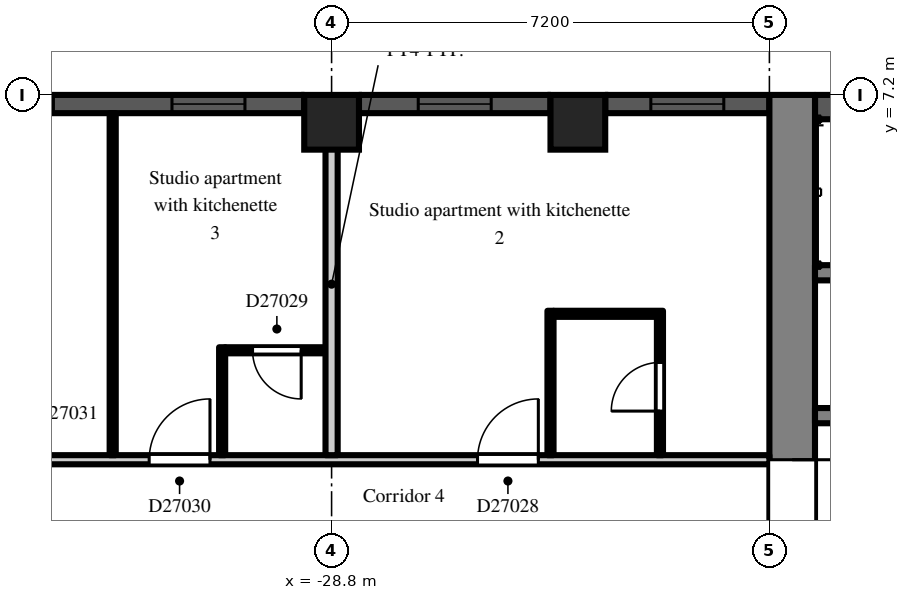
"""IFC4 building model, lengths in metres.
Left out: names, types, materials, properties, quantities, classifications, styles, units other than length and angle.
Written with IfcOpenShell. Run it as: python <this file> out.ifc"""

import sys

from ifc_helpers import new_model, si_unit, direction, frame, frame_2d, origin, origin_2d, place, context, subcontext, project, spatial, rectangle, extrude, element, fill, save


model = new_model("IFC4")
c1 = context("Model", 3, precision=1e-05, world=origin(), true_north=direction((0.0, 1.0)))
c2 = subcontext(c1, "Body", "Model", "MODEL_VIEW")
j1 = project(units=[si_unit("LENGTHUNIT", "METRE"), si_unit("PLANEANGLEUNIT", "RADIAN")], contexts=[c1])
p1 = place(None, origin())
s1 = spatial("IfcSite", under=j1, at=p1, CompositionType="ELEMENT")
p2 = place(p1, origin())
s2 = spatial("IfcBuilding", under=s1, at=p2, CompositionType="ELEMENT")
p3 = place(p2, frame((0.0, 0.0, 191.7)))
s3 = spatial("IfcBuildingStorey", under=s2, at=p3, CompositionType="ELEMENT", Elevation=191.7)
for number, where, z_axis, x_axis in (
    (1, (-28.8, 6.75, 0.0), (0.0, 0.0, 1.0), (1.0, 0.0, 0.0)),
    (2, (-24.75, 6.75, 0.0), (0.0, 0.0, 1.0), (1.0, 0.0, 0.0)),
):
    element("IfcColumn", number, at=place(p3, frame(where, z_axis=z_axis, x_axis=x_axis)), inside=s3, PredefinedType="COLUMN", context=c2, shape_type="SweptSolid", body=[
        extrude(rectangle(XDim=0.9, YDim=0.9, at=origin_2d()), origin(), (0.0, 0.0, 1.0), 3.0),
    ])
p4 = place(p3, frame((-21.6, 7.05, 0.0), z_axis=(0.0, 0.0, 1.0), x_axis=(-1.0, 0.0, 0.0)))
e3 = element("IfcWall", 3, at=p4, inside=s3, PredefinedType="SOLIDWALL", context=c2, shape_type="SweptSolid", body=[
    extrude(rectangle(XDim=2.7, YDim=0.3, at=frame_2d((1.35, 0.0))), origin(), (0.0, 0.0, 1.0), 2.3),
])
p5 = place(p4, frame((0.75, 0.0, 0.2)))
e4 = element("IfcOpeningElement", 4, at=p5, cuts=e3, PredefinedType="OPENING", context=c2, shape_type="SweptSolid", body=[
    extrude(rectangle(XDim=1.2, YDim=1.85, at=frame_2d((0.6, 0.925))), frame((0.0, 0.16, 0.0), z_axis=(0.0, -1.0, 0.0), x_axis=(1.0, 0.0, 0.0)), (0.0, 0.0, 1.0), 0.32),
])
p6 = place(p3, frame((-25.2, 7.05, 0.0), z_axis=(0.0, 0.0, 1.0), x_axis=(-1.0, 0.0, 0.0)))
e5 = element("IfcWall", 5, at=p6, inside=s3, PredefinedType="SOLIDWALL", context=c2, shape_type="SweptSolid", body=[
    extrude(rectangle(XDim=3.15, YDim=0.3, at=frame_2d((1.575, 0.0))), origin(), (0.0, 0.0, 1.0), 2.3),
])
p7 = place(p6, frame((0.975, 0.0, 0.2)))
e6 = element("IfcOpeningElement", 6, at=p7, cuts=e5, PredefinedType="OPENING", context=c2, shape_type="SweptSolid", body=[
    extrude(rectangle(XDim=1.2, YDim=1.85, at=frame_2d((0.6, 0.925))), frame((0.0, 0.16, 0.0), z_axis=(0.0, -1.0, 0.0), x_axis=(1.0, 0.0, 0.0)), (0.0, 0.0, 1.0), 0.32),
])
p8 = place(p3, frame((-29.25, 7.05, 0.0), z_axis=(0.0, 0.0, 1.0), x_axis=(-1.0, 0.0, 0.0)))
e7 = element("IfcWall", 7, at=p8, inside=s3, PredefinedType="SOLIDWALL", context=c2, shape_type="SweptSolid", body=[
    extrude(rectangle(XDim=6.3, YDim=0.3, at=frame_2d((3.15, 0.0))), origin(), (0.0, 0.0, 1.0), 2.3),
])
p9 = place(p8, frame((0.975, 0.0, 0.2)))
e8 = element("IfcOpeningElement", 8, at=p9, cuts=e7, PredefinedType="OPENING", context=c2, shape_type="SweptSolid", body=[
    extrude(rectangle(XDim=1.2, YDim=1.85, at=frame_2d((0.6, 0.925))), frame((0.0, 0.16, 0.0), z_axis=(0.0, -1.0, 0.0), x_axis=(1.0, 0.0, 0.0)), (0.0, 0.0, 1.0), 0.32),
])
p10 = place(p8, frame((4.125, 0.0, 0.2)))
e9 = element("IfcOpeningElement", 9, at=p10, cuts=e7, PredefinedType="OPENING", context=c2, shape_type="SweptSolid", body=[
    extrude(rectangle(XDim=1.2, YDim=1.85, at=frame_2d((0.6, 0.925))), frame((0.0, 0.16, 0.0), z_axis=(0.0, -1.0, 0.0), x_axis=(1.0, 0.0, 0.0)), (0.0, 0.0, 1.0), 0.32),
])
p11 = place(p3, frame((-21.225, -7.2, 0.0), z_axis=(0.0, 0.0, 1.0), x_axis=(0.0, 1.0, 0.0)))
e10 = element("IfcWall", 10, at=p11, inside=s3, PredefinedType="SHEAR", context=c2, shape_type="SweptSolid", body=[
    extrude(rectangle(XDim=14.4, YDim=0.75, at=frame_2d((7.2, 0.0))), origin(), (0.0, 0.0, 1.0), 2.55),
])
p12 = place(p11, frame((6.0, 0.0, 0.0)))
e11 = element("IfcOpeningElement", 11, at=p12, cuts=e10, PredefinedType="OPENING", context=c2, shape_type="SweptSolid", body=[
    extrude(rectangle(XDim=2.4, YDim=2.2, at=frame_2d((1.2, 1.1))), frame((0.0, 0.385, 0.0), z_axis=(0.0, -1.0, 0.0), x_axis=(1.0, 0.0, 0.0)), (0.0, 0.0, 1.0), 0.77),
])
p13 = place(p3, frame((-7.9, 7.0, 0.0), z_axis=(0.0, 0.0, 1.0), x_axis=(-1.0, 0.0, 0.0)))
e12 = element("IfcWall", 12, at=p13, inside=s3, PredefinedType="SHEAR", context=c2, shape_type="SweptSolid", body=[
    extrude(rectangle(XDim=12.95, YDim=0.4, at=frame_2d((6.475, 0.0))), origin(), (0.0, 0.0, 1.0), 2.55),
])
p14 = place(p3, frame((-7.9, 1.925, 0.0), z_axis=(0.0, 0.0, 1.0), x_axis=(-1.0, 0.0, 0.0)))
e13 = element("IfcWall", 13, at=p14, inside=s3, PredefinedType="SHEAR", context=c2, shape_type="SweptSolid", body=[
    extrude(rectangle(XDim=12.95, YDim=0.25, at=frame_2d((6.475, 0.0))), origin(), (0.0, 0.0, 1.0), 2.55),
])
p15 = place(p14, frame((4.825, 0.0, 0.0)))
e14 = element("IfcOpeningElement", 14, at=p15, cuts=e13, PredefinedType="OPENING", context=c2, shape_type="SweptSolid", body=[
    extrude(rectangle(XDim=1.1, YDim=2.1, at=frame_2d((0.55, 1.05))), frame((0.0, 0.135, 0.0), z_axis=(0.0, -1.0, 0.0), x_axis=(1.0, 0.0, 0.0)), (0.0, 0.0, 1.0), 0.27),
])
p16 = place(p14, frame((7.025, 0.0, 0.0)))
e15 = element("IfcOpeningElement", 15, at=p16, cuts=e13, PredefinedType="OPENING", context=c2, shape_type="SweptSolid", body=[
    extrude(rectangle(XDim=1.1, YDim=2.1, at=frame_2d((0.55, 1.05))), frame((0.0, 0.135, 0.0), z_axis=(0.0, -1.0, 0.0), x_axis=(1.0, 0.0, 0.0)), (0.0, 0.0, 1.0), 0.27),
])
p17 = place(p14, frame((9.225, 0.0, 0.0)))
e16 = element("IfcOpeningElement", 16, at=p17, cuts=e13, PredefinedType="OPENING", context=c2, shape_type="SweptSolid", body=[
    extrude(rectangle(XDim=1.1, YDim=2.1, at=frame_2d((0.55, 1.05))), frame((0.0, 0.135, 0.0), z_axis=(0.0, -1.0, 0.0), x_axis=(1.0, 0.0, 0.0)), (0.0, 0.0, 1.0), 0.27),
])
p18 = place(p14, frame((0.525, 0.0, 0.0)))
e17 = element("IfcOpeningElement", 17, at=p18, cuts=e13, PredefinedType="OPENING", context=c2, shape_type="SweptSolid", body=[
    extrude(rectangle(XDim=0.9, YDim=2.1, at=frame_2d((0.45, 1.05))), frame((0.0, 0.135, 0.0), z_axis=(0.0, -1.0, 0.0), x_axis=(1.0, 0.0, 0.0)), (0.0, 0.0, 1.0), 0.27),
])
p19 = place(p14, frame((2.625, 0.0, 0.0)))
e18 = element("IfcOpeningElement", 18, at=p19, cuts=e13, PredefinedType="OPENING", context=c2, shape_type="SweptSolid", body=[
    extrude(rectangle(XDim=1.1, YDim=2.1, at=frame_2d((0.55, 1.05))), frame((0.0, 0.135, 0.0), z_axis=(0.0, -1.0, 0.0), x_axis=(1.0, 0.0, 0.0)), (0.0, 0.0, 1.0), 0.27),
])
p20 = place(p14, frame((11.525, 0.0, 0.0)))
e19 = element("IfcOpeningElement", 19, at=p20, cuts=e13, PredefinedType="OPENING", context=c2, shape_type="SweptSolid", body=[
    extrude(rectangle(XDim=0.9, YDim=2.1, at=frame_2d((0.45, 1.05))), frame((0.0, 0.135, 0.0), z_axis=(0.0, -1.0, 0.0), x_axis=(1.0, 0.0, 0.0)), (0.0, 0.0, 1.0), 0.27),
])
p21 = place(p3, frame((-12.3, 4.275, 0.0), z_axis=(0.0, 0.0, 1.0), x_axis=(-1.0, 0.0, 0.0)))
e20 = element("IfcWall", 20, at=p21, inside=s3, PredefinedType="SHEAR", context=c2, shape_type="SweptSolid", body=[
    extrude(rectangle(XDim=8.55, YDim=0.25, at=frame_2d((4.275, 0.0))), origin(), (0.0, 0.0, 1.0), 2.55),
])
p22 = place(p3, frame((-36.5, 1.2, 0.0), z_axis=(0.0, 0.0, 1.0), x_axis=(1.0, 0.0, 0.0)))
e21 = element("IfcWall", 21, at=p22, inside=s3, PredefinedType="PARTITIONING", context=c2, shape_type="SweptSolid", body=[
    extrude(rectangle(XDim=14.9, YDim=0.15, at=frame_2d((7.45, 0.0))), origin(), (0.0, 0.0, 1.0), 2.55),
])
p23 = place(p22, frame((10.1, 0.0, 0.0)))
e22 = element("IfcOpeningElement", 22, at=p23, cuts=e21, PredefinedType="OPENING", context=c2, shape_type="SweptSolid", body=[
    extrude(rectangle(XDim=1.0, YDim=2.1, at=frame_2d((0.5, 1.05))), frame((0.0, 0.085, 0.0), z_axis=(0.0, -1.0, 0.0), x_axis=(1.0, 0.0, 0.0)), (0.0, 0.0, 1.0), 0.17),
])
p24 = place(p22, frame((4.7, 0.0, 0.0)))
e23 = element("IfcOpeningElement", 23, at=p24, cuts=e21, PredefinedType="OPENING", context=c2, shape_type="SweptSolid", body=[
    extrude(rectangle(XDim=1.0, YDim=2.1, at=frame_2d((0.5, 1.05))), frame((0.0, 0.085, 0.0), z_axis=(0.0, -1.0, 0.0), x_axis=(1.0, 0.0, 0.0)), (0.0, 0.0, 1.0), 0.17),
])
p25 = place(p22, frame((1.15, 0.0, 0.0)))
e24 = element("IfcOpeningElement", 24, at=p25, cuts=e21, PredefinedType="OPENING", context=c2, shape_type="SweptSolid", body=[
    extrude(rectangle(XDim=1.8, YDim=2.1, at=frame_2d((0.9, 1.05))), frame((0.0, 0.085, 0.0), z_axis=(0.0, -1.0, 0.0), x_axis=(1.0, 0.0, 0.0)), (0.0, 0.0, 1.0), 0.17),
])
p26 = place(p3, frame((-32.4, 1.275, 0.0), z_axis=(0.0, 0.0, 1.0), x_axis=(0.0, 1.0, 0.0)))
e25 = element("IfcWall", 25, at=p26, inside=s3, PredefinedType="PARTITIONING", context=c2, shape_type="SweptSolid", body=[
    extrude(rectangle(XDim=5.625, YDim=0.1, at=frame_2d((2.812, 0.0))), origin(), (0.0, 0.0, 1.0), 2.55),
])
p27 = place(p3, frame((-30.6, 1.275, 0.0), z_axis=(0.0, 0.0, 1.0), x_axis=(0.0, 1.0, 0.0)))
e26 = element("IfcWall", 26, at=p27, inside=s3, PredefinedType="PARTITIONING", context=c2, shape_type="SweptSolid", body=[
    extrude(rectangle(XDim=1.775, YDim=0.1, at=frame_2d((0.888, 0.0))), origin(), (0.0, 0.0, 1.0), 2.55),
])
p28 = place(p3, frame((-30.55, 3.0, 0.0), z_axis=(0.0, 0.0, 1.0), x_axis=(1.0, 0.0, 0.0)))
e27 = element("IfcWall", 27, at=p28, inside=s3, PredefinedType="PARTITIONING", context=c2, shape_type="SweptSolid", body=[
    extrude(rectangle(XDim=1.65, YDim=0.1, at=frame_2d((0.825, 0.0))), origin(), (0.0, 0.0, 1.0), 2.55),
])
p29 = place(p28, frame((0.45, 0.0, 0.0)))
e28 = element("IfcOpeningElement", 28, at=p29, cuts=e27, PredefinedType="OPENING", context=c2, shape_type="SweptSolid", body=[
    extrude(rectangle(XDim=0.8, YDim=2.1, at=frame_2d((0.4, 1.05))), frame((0.0, 0.06, 0.0), z_axis=(0.0, -1.0, 0.0), x_axis=(1.0, 0.0, 0.0)), (0.0, 0.0, 1.0), 0.12),
])
p30 = place(p3, frame((-28.8, 1.275, 0.0), z_axis=(0.0, 0.0, 1.0), x_axis=(0.0, 1.0, 0.0)))
e29 = element("IfcWall", 29, at=p30, inside=s3, PredefinedType="PARTITIONING", context=c2, shape_type="SweptSolid", body=[
    extrude(rectangle(XDim=5.625, YDim=0.2, at=frame_2d((2.812, 0.0))), origin(), (0.0, 0.0, 1.0), 2.55),
])
p31 = place(p3, frame((-25.2, 1.275, 0.0), z_axis=(0.0, 0.0, 1.0), x_axis=(0.0, 1.0, 0.0)))
e30 = element("IfcWall", 30, at=p31, inside=s3, PredefinedType="PARTITIONING", context=c2, shape_type="SweptSolid", body=[
    extrude(rectangle(XDim=2.375, YDim=0.1, at=frame_2d((1.188, 0.0))), origin(), (0.0, 0.0, 1.0), 2.55),
])
p32 = place(p3, frame((-25.15, 3.6, 0.0), z_axis=(0.0, 0.0, 1.0), x_axis=(1.0, 0.0, 0.0)))
e31 = element("IfcWall", 31, at=p32, inside=s3, PredefinedType="PARTITIONING", context=c2, shape_type="SweptSolid", body=[
    extrude(rectangle(XDim=1.8, YDim=0.1, at=frame_2d((0.9, 0.0))), origin(), (0.0, 0.0, 1.0), 2.55),
])
p33 = place(p3, frame((-23.4, 1.275, 0.0), z_axis=(0.0, 0.0, 1.0), x_axis=(0.0, 1.0, 0.0)))
e32 = element("IfcWall", 32, at=p33, inside=s3, PredefinedType="PARTITIONING", context=c2, shape_type="SweptSolid", body=[
    extrude(rectangle(XDim=2.275, YDim=0.1, at=frame_2d((1.138, 0.0))), origin(), (0.0, 0.0, 1.0), 2.55),
])
p34 = place(p33, frame((0.725, 0.0, 0.0)))
e33 = element("IfcOpeningElement", 33, at=p34, cuts=e32, PredefinedType="OPENING", context=c2, shape_type="SweptSolid", body=[
    extrude(rectangle(XDim=0.8, YDim=2.1, at=frame_2d((0.4, 1.05))), frame((0.0, 0.06, 0.0), z_axis=(0.0, -1.0, 0.0), x_axis=(1.0, 0.0, 0.0)), (0.0, 0.0, 1.0), 0.12),
])
p35 = place(p5, origin())
e34 = element("IfcWindow", 34, at=p35, inside=s3, PartitioningType="SINGLE_PANEL", PredefinedType="WINDOW", context=c2, shape_type="SweptSolid", body=[
    extrude(rectangle(XDim=1.2, YDim=1.85, at=frame_2d((0.6, 0.925))), frame((0.0, 0.03, 0.0), z_axis=(0.0, -1.0, 0.0), x_axis=(1.0, 0.0, 0.0)), (0.0, 0.0, 1.0), 0.06),
])
fill(e4, e34)
p36 = place(p7, origin())
e35 = element("IfcWindow", 35, at=p36, inside=s3, PartitioningType="SINGLE_PANEL", PredefinedType="WINDOW", context=c2, shape_type="SweptSolid", body=[
    extrude(rectangle(XDim=1.2, YDim=1.85, at=frame_2d((0.6, 0.925))), frame((0.0, 0.03, 0.0), z_axis=(0.0, -1.0, 0.0), x_axis=(1.0, 0.0, 0.0)), (0.0, 0.0, 1.0), 0.06),
])
fill(e6, e35)
p37 = place(p9, origin())
e36 = element("IfcWindow", 36, at=p37, inside=s3, PartitioningType="SINGLE_PANEL", PredefinedType="WINDOW", context=c2, shape_type="SweptSolid", body=[
    extrude(rectangle(XDim=1.2, YDim=1.85, at=frame_2d((0.6, 0.925))), frame((0.0, 0.03, 0.0), z_axis=(0.0, -1.0, 0.0), x_axis=(1.0, 0.0, 0.0)), (0.0, 0.0, 1.0), 0.06),
])
fill(e8, e36)
p38 = place(p10, origin())
e37 = element("IfcWindow", 37, at=p38, inside=s3, PartitioningType="SINGLE_PANEL", PredefinedType="WINDOW", context=c2, shape_type="SweptSolid", body=[
    extrude(rectangle(XDim=1.2, YDim=1.85, at=frame_2d((0.6, 0.925))), frame((0.0, 0.03, 0.0), z_axis=(0.0, -1.0, 0.0), x_axis=(1.0, 0.0, 0.0)), (0.0, 0.0, 1.0), 0.06),
])
fill(e9, e37)
p39 = place(p12, frame((2.4, 0.0, 0.0), z_axis=(0.0, 0.0, 1.0), x_axis=(-1.0, 0.0, 0.0)))
e38 = element("IfcDoor", 38, at=p39, inside=s3, OperationType="DOUBLE_DOOR_DOUBLE_SWING", PredefinedType="DOOR", context=c2, shape_type="SweptSolid", body=[
    extrude(rectangle(XDim=2.4, YDim=2.2, at=frame_2d((1.2, 1.1))), frame((0.0, 0.025, 0.0), z_axis=(0.0, -1.0, 0.0), x_axis=(1.0, 0.0, 0.0)), (0.0, 0.0, 1.0), 0.05),
])
fill(e11, e38)
p40 = place(p34, origin())
e39 = element("IfcDoor", 39, at=p40, inside=s3, OperationType="SINGLE_SWING_LEFT", PredefinedType="DOOR", context=c2, shape_type="SweptSolid", body=[
    extrude(rectangle(XDim=0.8, YDim=2.1, at=frame_2d((0.4, 1.05))), frame((0.0, 0.025, 0.0), z_axis=(0.0, -1.0, 0.0), x_axis=(1.0, 0.0, 0.0)), (0.0, 0.0, 1.0), 0.05),
])
fill(e33, e39)
p41 = place(p23, origin())
e40 = element("IfcDoor", 40, at=p41, inside=s3, OperationType="SINGLE_SWING_RIGHT", PredefinedType="DOOR", context=c2, shape_type="SweptSolid", body=[
    extrude(rectangle(XDim=1.0, YDim=2.1, at=frame_2d((0.5, 1.05))), frame((0.0, 0.025, 0.0), z_axis=(0.0, -1.0, 0.0), x_axis=(1.0, 0.0, 0.0)), (0.0, 0.0, 1.0), 0.05),
])
fill(e22, e40)
p42 = place(p29, frame((0.8, 0.0, 0.0), z_axis=(0.0, 0.0, 1.0), x_axis=(-1.0, 0.0, 0.0)))
e41 = element("IfcDoor", 41, at=p42, inside=s3, OperationType="SINGLE_SWING_LEFT", PredefinedType="DOOR", context=c2, shape_type="SweptSolid", body=[
    extrude(rectangle(XDim=0.8, YDim=2.1, at=frame_2d((0.4, 1.05))), frame((0.0, 0.025, 0.0), z_axis=(0.0, -1.0, 0.0), x_axis=(1.0, 0.0, 0.0)), (0.0, 0.0, 1.0), 0.05),
])
fill(e28, e41)
p43 = place(p24, origin())
e42 = element("IfcDoor", 42, at=p43, inside=s3, OperationType="SINGLE_SWING_RIGHT", PredefinedType="DOOR", context=c2, shape_type="SweptSolid", body=[
    extrude(rectangle(XDim=1.0, YDim=2.1, at=frame_2d((0.5, 1.05))), frame((0.0, 0.025, 0.0), z_axis=(0.0, -1.0, 0.0), x_axis=(1.0, 0.0, 0.0)), (0.0, 0.0, 1.0), 0.05),
])
fill(e23, e42)
save(model, sys.argv[1])
